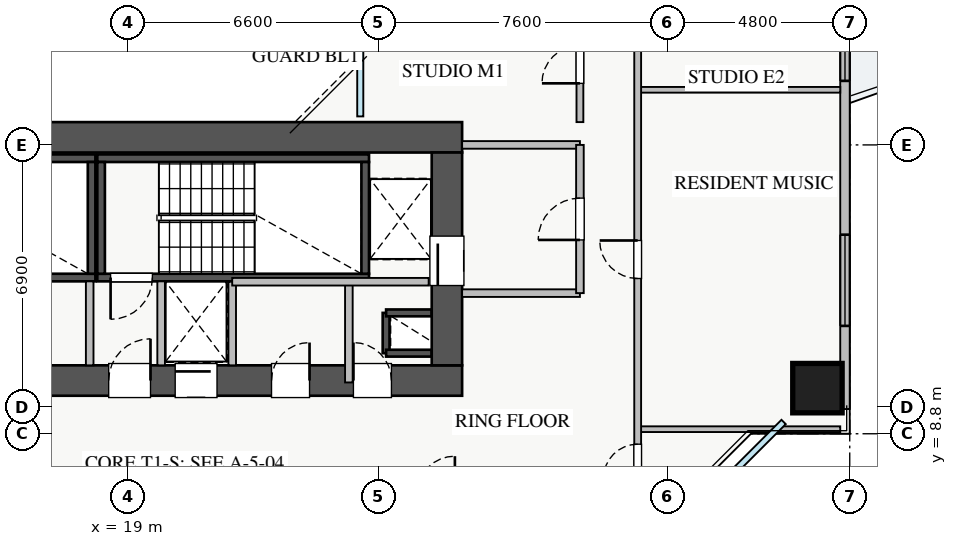
"""IFC4 building model, lengths in metres.
Left out: names, types, materials, properties, quantities, classifications, styles, units other than length and angle.
Written with IfcOpenShell. Run it as: python <this file> out.ifc"""

import sys

from ifc_helpers import new_model, si_unit, direction, frame, frame_2d, origin, origin_2d, place, context, subcontext, project, spatial, rectangle, extrude, source, transform, mapped, element, fill, save


model = new_model("IFC4")
c1 = context("Model", 3, precision=1e-05, world=origin(), true_north=direction((0.0, 1.0)))
c2 = subcontext(c1, "Body", "Model", "MODEL_VIEW")
j1 = project(units=[si_unit("LENGTHUNIT", "METRE"), si_unit("PLANEANGLEUNIT", "RADIAN")], contexts=[c1])
p1 = place(None, origin())
s1 = spatial("IfcSite", under=j1, at=p1, CompositionType="ELEMENT")
p2 = place(p1, origin())
s2 = spatial("IfcBuilding", under=s1, at=p2, CompositionType="ELEMENT")
p3 = place(p2, frame((0.0, 0.0, 79.5)))
s3 = spatial("IfcBuildingStorey", under=s2, at=p3, CompositionType="ELEMENT", Elevation=79.5)
p4 = place(p3, frame((25.8, 10.92, 0.0), z_axis=(0.0, 0.0, 1.0), x_axis=(0.0, 1.0, 0.0)))
e1 = element("IfcWall", 1, at=p4, inside=s3, PredefinedType="SHEAR", context=c2, shape_type="SweptSolid", body=[
    extrude(rectangle(XDim=1.06, YDim=0.18, at=frame_2d((0.53, 0.0))), origin(), (0.0, 0.0, 1.0), 3.07),
])
for number, where, z_axis, x_axis in (
    (2, (25.8, 11.98, 0.0), (0.0, 0.0, 1.0), (1.0, 0.0, 0.0)),
    (3, (25.8, 10.92, 0.0), (0.0, 0.0, 1.0), (1.0, 0.0, 0.0)),
):
    element("IfcWall", number, at=place(p3, frame(where, z_axis=z_axis, x_axis=x_axis)), inside=s3, PredefinedType="SHEAR", context=c2, shape_type="SweptSolid", body=[
        extrude(rectangle(XDim=1.2, YDim=0.18, at=frame_2d((0.6, 0.0))), origin(), (0.0, 0.0, 1.0), 3.07),
    ])
p5 = place(p3, frame((19.88, 12.8, 0.0), z_axis=(0.0, 0.0, 1.0), x_axis=(1.0, 0.0, 0.0)))
e4 = element("IfcWall", 4, at=p5, inside=s3, PredefinedType="SHEAR", context=c2, shape_type="SweptSolid", body=[
    extrude(rectangle(XDim=1.87, YDim=0.18, at=frame_2d((0.935, 0.0))), origin(), (0.0, 0.0, 1.0), 3.07),
])
p6 = place(p3, frame((11.0, 12.91, 0.0), z_axis=(0.0, 0.0, 1.0), x_axis=(1.0, 0.0, 0.0)))
e5 = element("IfcWall", 5, at=p6, inside=s3, PredefinedType="SHEAR", context=c2, shape_type="SweptSolid", body=[
    extrude(rectangle(XDim=7.15, YDim=0.2, at=frame_2d((3.575, 0.0))), origin(), (0.0, 0.0, 1.0), 3.25),
])
p7 = place(p6, frame((0.35, 0.0, 0.0)))
e6 = element("IfcOpeningElement", 6, at=p7, cuts=e5, PredefinedType="OPENING", context=c2, shape_type="SweptSolid", body=[
    extrude(rectangle(XDim=1.1, YDim=2.05, at=frame_2d((0.55, 1.025))), frame((0.0, 0.11, 0.0), z_axis=(0.0, -1.0, 0.0), x_axis=(1.0, 0.0, 0.0)), (0.0, 0.0, 1.0), 0.22),
])
p8 = place(p3, frame((11.0, 16.05, 0.0), z_axis=(0.0, 0.0, 1.0), x_axis=(1.0, 0.0, 0.0)))
e7 = element("IfcWall", 7, at=p8, inside=s3, PredefinedType="SHEAR", context=c2, shape_type="SweptSolid", body=[
    extrude(rectangle(XDim=7.15, YDim=0.2, at=frame_2d((3.575, 0.0))), origin(), (0.0, 0.0, 1.0), 3.25),
])
p9 = place(p3, frame((18.05, 13.01, 0.0), z_axis=(0.0, 0.0, 1.0), x_axis=(0.0, 1.0, 0.0)))
e8 = element("IfcWall", 8, at=p9, inside=s3, PredefinedType="SHEAR", context=c2, shape_type="SweptSolid", body=[
    extrude(rectangle(XDim=2.94, YDim=0.2, at=frame_2d((1.47, 0.0))), origin(), (0.0, 0.0, 1.0), 3.25),
])
p10 = place(p3, frame((18.2, 12.91, 0.0), z_axis=(0.0, 0.0, 1.0), x_axis=(1.0, 0.0, 0.0)))
e9 = element("IfcWall", 9, at=p10, inside=s3, PredefinedType="SHEAR", context=c2, shape_type="SweptSolid", body=[
    extrude(rectangle(XDim=7.15, YDim=0.2, at=frame_2d((3.575, 0.0))), origin(), (0.0, 0.0, 1.0), 3.25),
])
p11 = place(p10, frame((0.35, 0.0, 0.0)))
e10 = element("IfcOpeningElement", 10, at=p11, cuts=e9, PredefinedType="OPENING", context=c2, shape_type="SweptSolid", body=[
    extrude(rectangle(XDim=1.1, YDim=2.05, at=frame_2d((0.55, 1.025))), frame((0.0, 0.11, 0.0), z_axis=(0.0, -1.0, 0.0), x_axis=(1.0, 0.0, 0.0)), (0.0, 0.0, 1.0), 0.22),
])
p12 = place(p3, frame((18.2, 16.05, 0.0), z_axis=(0.0, 0.0, 1.0), x_axis=(1.0, 0.0, 0.0)))
e11 = element("IfcWall", 11, at=p12, inside=s3, PredefinedType="SHEAR", context=c2, shape_type="SweptSolid", body=[
    extrude(rectangle(XDim=7.15, YDim=0.2, at=frame_2d((3.575, 0.0))), origin(), (0.0, 0.0, 1.0), 3.25),
])
for number, where, z_axis, x_axis in (
    (12, (18.3, 13.01, 0.0), (0.0, 0.0, 1.0), (0.0, 1.0, 0.0)),
    (13, (25.25, 13.01, 0.0), (0.0, 0.0, 1.0), (0.0, 1.0, 0.0)),
):
    element("IfcWall", number, at=place(p3, frame(where, z_axis=z_axis, x_axis=x_axis)), inside=s3, PredefinedType="SHEAR", context=c2, shape_type="SweptSolid", body=[
        extrude(rectangle(XDim=2.94, YDim=0.2, at=frame_2d((1.47, 0.0))), origin(), (0.0, 0.0, 1.0), 3.25),
    ])
p13 = place(p3, frame((10.2, 10.2, 0.0), z_axis=(0.0, 0.0, 1.0), x_axis=(1.0, 0.0, 0.0)))
e14 = element("IfcWall", 14, at=p13, inside=s3, PredefinedType="SHEAR", context=c2, shape_type="SweptSolid", body=[
    extrude(rectangle(XDim=17.6, YDim=0.8, at=frame_2d((8.8, 0.0))), origin(), (0.0, 0.0, 1.0), 3.25),
])
p14 = place(p13, frame((1.15, 0.0, 0.0)))
e15 = element("IfcOpeningElement", 15, at=p14, cuts=e14, PredefinedType="OPENING", context=c2, shape_type="SweptSolid", body=[
    extrude(rectangle(XDim=1.1, YDim=2.05, at=frame_2d((0.55, 1.025))), frame((0.0, 0.41, 0.0), z_axis=(0.0, -1.0, 0.0), x_axis=(1.0, 0.0, 0.0)), (0.0, 0.0, 1.0), 0.82),
])
p15 = place(p13, frame((8.3, 0.0, 0.0)))
e16 = element("IfcOpeningElement", 16, at=p15, cuts=e14, PredefinedType="OPENING", context=c2, shape_type="SweptSolid", body=[
    extrude(rectangle(XDim=1.1, YDim=2.05, at=frame_2d((0.55, 1.025))), frame((0.0, 0.41, 0.0), z_axis=(0.0, -1.0, 0.0), x_axis=(1.0, 0.0, 0.0)), (0.0, 0.0, 1.0), 0.82),
])
p16 = place(p13, frame((10.05, 0.0, 0.0)))
e17 = element("IfcOpeningElement", 17, at=p16, cuts=e14, PredefinedType="OPENING", context=c2, shape_type="SweptSolid", body=[
    extrude(rectangle(XDim=1.1, YDim=2.05, at=frame_2d((0.55, 1.025))), frame((0.0, 0.41, 0.0), z_axis=(0.0, -1.0, 0.0), x_axis=(1.0, 0.0, 0.0)), (0.0, 0.0, 1.0), 0.82),
])
p17 = place(p13, frame((14.74, 0.0, 0.0)))
e18 = element("IfcOpeningElement", 18, at=p17, cuts=e14, PredefinedType="OPENING", context=c2, shape_type="SweptSolid", body=[
    extrude(rectangle(XDim=1.0, YDim=2.05, at=frame_2d((0.5, 1.025))), frame((0.0, 0.41, 0.0), z_axis=(0.0, -1.0, 0.0), x_axis=(1.0, 0.0, 0.0)), (0.0, 0.0, 1.0), 0.82),
])
p18 = place(p13, frame((12.585, 0.0, 0.0)))
e19 = element("IfcOpeningElement", 19, at=p18, cuts=e14, PredefinedType="OPENING", context=c2, shape_type="SweptSolid", body=[
    extrude(rectangle(XDim=1.0, YDim=2.05, at=frame_2d((0.5, 1.025))), frame((0.0, 0.41, 0.0), z_axis=(0.0, -1.0, 0.0), x_axis=(1.0, 0.0, 0.0)), (0.0, 0.0, 1.0), 0.82),
])
p19 = place(p3, frame((10.2, 16.6, 0.0), z_axis=(0.0, 0.0, 1.0), x_axis=(1.0, 0.0, 0.0)))
e20 = element("IfcWall", 20, at=p19, inside=s3, PredefinedType="SHEAR", context=c2, shape_type="SweptSolid", body=[
    extrude(rectangle(XDim=17.6, YDim=0.8, at=frame_2d((8.8, 0.0))), origin(), (0.0, 0.0, 1.0), 3.25),
])
p20 = place(p3, frame((27.4, 10.6, 0.0), z_axis=(0.0, 0.0, 1.0), x_axis=(0.0, 1.0, 0.0)))
e21 = element("IfcWall", 21, at=p20, inside=s3, PredefinedType="SHEAR", context=c2, shape_type="SweptSolid", body=[
    extrude(rectangle(XDim=5.6, YDim=0.8, at=frame_2d((2.8, 0.0))), origin(), (0.0, 0.0, 1.0), 3.25),
])
p21 = place(p20, frame((2.1, 0.0, 0.0)))
e22 = element("IfcOpeningElement", 22, at=p21, cuts=e21, PredefinedType="OPENING", context=c2, shape_type="SweptSolid", body=[
    extrude(rectangle(XDim=1.3, YDim=2.05, at=frame_2d((0.65, 1.025))), frame((0.0, 0.41, 0.0), z_axis=(0.0, -1.0, 0.0), x_axis=(1.0, 0.0, 0.0)), (0.0, 0.0, 1.0), 0.82),
])
m1 = source(origin(), c2, "Body", "SweptSolid", [
    extrude(rectangle(XDim=1.3, YDim=1.3, at=origin_2d()), origin(), (0.0, 0.0, 1.0), 3.25),
])
p22 = place(p3, frame((37.15, 10.0, 0.0), z_axis=(0.0, 0.0, 1.0), x_axis=(1.0, 0.0, 0.0)))
e23 = element("IfcColumn", 23, at=p22, inside=s3, PredefinedType="COLUMN", context=c2, shape_type="MappedRepresentation", body=[
    mapped(m1, transform((0.0, 0.0, 0.0), x_axis=(1.0, 0.0, 0.0), y_axis=(0.0, 1.0, 0.0), z_axis=(0.0, 0.0, 1.0), scale=1.0)),
])
p23 = place(p3, frame((37.875, 9.45, 0.0), z_axis=(0.0, 0.0, 1.0), x_axis=(0.0, 1.0, 0.0)))
e24 = element("IfcWall", 24, at=p23, inside=s3, PredefinedType="STANDARD", context=c2, shape_type="SweptSolid", body=[
    extrude(rectangle(XDim=27.1, YDim=0.25, at=frame_2d((13.55, 0.0))), origin(), (0.0, 0.0, 1.0), 2.61),
])
p24 = place(p23, frame((14.4, 0.0, 0.0)))
e25 = element("IfcOpeningElement", 25, at=p24, cuts=e24, PredefinedType="OPENING", context=c2, shape_type="SweptSolid", body=[
    extrude(rectangle(XDim=1.2, YDim=2.1, at=frame_2d((0.6, 1.05))), frame((0.0, 0.135, 0.0), z_axis=(0.0, -1.0, 0.0), x_axis=(1.0, 0.0, 0.0)), (0.0, 0.0, 1.0), 0.27),
])
p25 = place(p23, frame((2.188, 0.0, 0.9)))
e26 = element("IfcOpeningElement", 26, at=p25, cuts=e24, PredefinedType="OPENING", context=c2, shape_type="SweptSolid", body=[
    extrude(rectangle(XDim=2.4, YDim=1.48, at=frame_2d((1.2, 0.74))), frame((0.0, 0.135, 0.0), z_axis=(0.0, -1.0, 0.0), x_axis=(1.0, 0.0, 0.0)), (0.0, 0.0, 1.0), 0.27),
])
p26 = place(p23, frame((23.788, 0.0, 0.9)))
e27 = element("IfcOpeningElement", 27, at=p26, cuts=e24, PredefinedType="OPENING", context=c2, shape_type="SweptSolid", body=[
    extrude(rectangle(XDim=1.8, YDim=1.5, at=frame_2d((0.9, 0.75))), frame((0.0, 0.135, 0.0), z_axis=(0.0, -1.0, 0.0), x_axis=(1.0, 0.0, 0.0)), (0.0, 0.0, 1.0), 0.27),
])
p27 = place(p23, frame((19.758, 0.0, 0.9)))
e28 = element("IfcOpeningElement", 28, at=p27, cuts=e24, PredefinedType="OPENING", context=c2, shape_type="SweptSolid", body=[
    extrude(rectangle(XDim=2.4, YDim=1.5, at=frame_2d((1.2, 0.75))), frame((0.0, 0.135, 0.0), z_axis=(0.0, -1.0, 0.0), x_axis=(1.0, 0.0, 0.0)), (0.0, 0.0, 1.0), 0.27),
])
p28 = place(p23, frame((8.635, 0.0, 0.9)))
e29 = element("IfcOpeningElement", 29, at=p28, cuts=e24, PredefinedType="OPENING", context=c2, shape_type="SweptSolid", body=[
    extrude(rectangle(XDim=0.9, YDim=1.2, at=frame_2d((0.45, 0.6))), frame((0.0, 0.135, 0.0), z_axis=(0.0, -1.0, 0.0), x_axis=(1.0, 0.0, 0.0)), (0.0, 0.0, 1.0), 0.27),
])
for number, where, z_axis, x_axis in (
    (30, (27.8, 16.4, 0.0), (0.0, 0.0, 1.0), (1.0, 0.0, 0.0)),
    (31, (27.8, 12.5, 0.0), (0.0, 0.0, 1.0), (1.0, 0.0, 0.0)),
):
    element("IfcWall", number, at=place(p3, frame(where, z_axis=z_axis, x_axis=x_axis)), inside=s3, PredefinedType="PARTITIONING", context=c2, shape_type="SweptSolid", body=[
        extrude(rectangle(XDim=3.1, YDim=0.2, at=frame_2d((1.55, 0.0))), origin(), (0.0, 0.0, 1.0), 3.07),
    ])
p29 = place(p3, frame((30.9, 12.5, 0.0), z_axis=(0.0, 0.0, 1.0), x_axis=(0.0, 1.0, 0.0)))
e32 = element("IfcWall", 32, at=p29, inside=s3, PredefinedType="PARTITIONING", context=c2, shape_type="SweptSolid", body=[
    extrude(rectangle(XDim=3.9, YDim=0.2, at=frame_2d((1.95, 0.0))), origin(), (0.0, 0.0, 1.0), 3.07),
])
p30 = place(p29, frame((1.4, 0.0, 0.0)))
e33 = element("IfcOpeningElement", 33, at=p30, cuts=e32, PredefinedType="OPENING", context=c2, shape_type="SweptSolid", body=[
    extrude(rectangle(XDim=1.1, YDim=2.05, at=frame_2d((0.55, 1.025))), frame((0.0, 0.11, 0.0), z_axis=(0.0, -1.0, 0.0), x_axis=(1.0, 0.0, 0.0)), (0.0, 0.0, 1.0), 0.22),
])
for number, where, z_axis, x_axis in (
    (34, (18.0, 10.6, 0.0), (0.0, 0.0, 1.0), (0.0, 1.0, 0.0)),
    (35, (19.88, 10.6, 0.0), (0.0, 0.0, 1.0), (0.0, 1.0, 0.0)),
):
    element("IfcWall", number, at=place(p3, frame(where, z_axis=z_axis, x_axis=x_axis)), inside=s3, PredefinedType="PARTITIONING", context=c2, shape_type="SweptSolid", body=[
        extrude(rectangle(XDim=2.21, YDim=0.2, at=frame_2d((1.105, 0.0))), origin(), (0.0, 0.0, 1.0), 3.07),
    ])
p31 = place(p3, frame((24.82, 10.15, 0.0), z_axis=(0.0, 0.0, 1.0), x_axis=(0.0, 1.0, 0.0)))
e36 = element("IfcWall", 36, at=p31, inside=s3, PredefinedType="PARTITIONING", context=c2, shape_type="SweptSolid", body=[
    extrude(rectangle(XDim=2.65, YDim=0.2, at=frame_2d((1.325, 0.0))), origin(), (0.0, 0.0, 1.0), 3.07),
])
p32 = place(p3, frame((21.75, 10.6, 0.0), z_axis=(0.0, 0.0, 1.0), x_axis=(0.0, 1.0, 0.0)))
e37 = element("IfcWall", 37, at=p32, inside=s3, PredefinedType="PARTITIONING", context=c2, shape_type="SweptSolid", body=[
    extrude(rectangle(XDim=2.2, YDim=0.2, at=frame_2d((1.1, 0.0))), origin(), (0.0, 0.0, 1.0), 3.07),
])
p33 = place(p3, frame((21.75, 12.8, 0.0), z_axis=(0.0, 0.0, 1.0), x_axis=(1.0, 0.0, 0.0)))
e38 = element("IfcWall", 38, at=p33, inside=s3, PredefinedType="PARTITIONING", context=c2, shape_type="SweptSolid", body=[
    extrude(rectangle(XDim=5.17, YDim=0.2, at=frame_2d((2.585, 0.0))), origin(), (0.0, 0.0, 1.0), 3.07),
])
for number, where, z_axis, x_axis in (
    (39, (32.42, 8.92, 0.0), (0.0, 0.0, 1.0), (1.0, 0.0, 0.0)),
    (40, (32.42, 17.85, 0.0), (0.0, 0.0, 1.0), (1.0, 0.0, 0.0)),
):
    element("IfcWall", number, at=place(p3, frame(where, z_axis=z_axis, x_axis=x_axis)), inside=s3, PredefinedType="PARTITIONING", context=c2, shape_type="SweptSolid", body=[
        extrude(rectangle(XDim=5.33, YDim=0.15, at=frame_2d((2.665, 0.0))), origin(), (0.0, 0.0, 1.0), 3.07),
    ])
p34 = place(p3, frame((32.42, 7.21, 0.0), z_axis=(0.0, 0.0, 1.0), x_axis=(0.0, 1.0, 0.0)))
e41 = element("IfcWall", 41, at=p34, inside=s3, PredefinedType="PARTITIONING", context=c2, shape_type="SweptSolid", body=[
    extrude(rectangle(XDim=31.23, YDim=0.18, at=frame_2d((15.615, 0.0))), origin(), (0.0, 0.0, 1.0), 2.821),
])
p35 = place(p34, frame((30.09, 0.0, 0.0)))
e42 = element("IfcOpeningElement", 42, at=p35, cuts=e41, PredefinedType="OPENING", context=c2, shape_type="SweptSolid", body=[
    extrude(rectangle(XDim=0.9, YDim=2.05, at=frame_2d((0.45, 1.025))), frame((0.0, 0.1, 0.0), z_axis=(0.0, -1.0, 0.0), x_axis=(1.0, 0.0, 0.0)), (0.0, 0.0, 1.0), 0.2),
])
p36 = place(p34, frame((0.415, 0.0, 0.0)))
e43 = element("IfcOpeningElement", 43, at=p36, cuts=e41, PredefinedType="OPENING", context=c2, shape_type="SweptSolid", body=[
    extrude(rectangle(XDim=0.9, YDim=2.05, at=frame_2d((0.45, 1.025))), frame((0.0, 0.1, 0.0), z_axis=(0.0, -1.0, 0.0), x_axis=(1.0, 0.0, 0.0)), (0.0, 0.0, 1.0), 0.2),
])
p37 = place(p34, frame((5.675, 0.0, 0.0)))
e44 = element("IfcOpeningElement", 44, at=p37, cuts=e41, PredefinedType="OPENING", context=c2, shape_type="SweptSolid", body=[
    extrude(rectangle(XDim=1.0, YDim=2.05, at=frame_2d((0.5, 1.025))), frame((0.0, 0.1, 0.0), z_axis=(0.0, -1.0, 0.0), x_axis=(1.0, 0.0, 0.0)), (0.0, 0.0, 1.0), 0.2),
])
p38 = place(p34, frame((12.575, 0.0, 0.0)))
e45 = element("IfcOpeningElement", 45, at=p38, cuts=e41, PredefinedType="OPENING", context=c2, shape_type="SweptSolid", body=[
    extrude(rectangle(XDim=1.0, YDim=2.05, at=frame_2d((0.5, 1.025))), frame((0.0, 0.1, 0.0), z_axis=(0.0, -1.0, 0.0), x_axis=(1.0, 0.0, 0.0)), (0.0, 0.0, 1.0), 0.2),
])
p39 = place(p34, frame((22.5, 0.0, 0.0)))
e46 = element("IfcOpeningElement", 46, at=p39, cuts=e41, PredefinedType="OPENING", context=c2, shape_type="SweptSolid", body=[
    extrude(rectangle(XDim=1.0, YDim=2.05, at=frame_2d((0.5, 1.025))), frame((0.0, 0.1, 0.0), z_axis=(0.0, -1.0, 0.0), x_axis=(1.0, 0.0, 0.0)), (0.0, 0.0, 1.0), 0.2),
])
p40 = place(p3, frame((30.9, 17.0, 0.0), z_axis=(0.0, 0.0, 1.0), x_axis=(0.0, 1.0, 0.0)))
e47 = element("IfcWall", 47, at=p40, inside=s3, PredefinedType="PARTITIONING", context=c2, shape_type="SweptSolid", body=[
    extrude(rectangle(XDim=12.0, YDim=0.18, at=frame_2d((6.0, 0.0))), origin(), (0.0, 0.0, 1.0), 3.07),
])
p41 = place(p40, frame((1.02, 0.0, 0.0)))
e48 = element("IfcOpeningElement", 48, at=p41, cuts=e47, PredefinedType="OPENING", context=c2, shape_type="SweptSolid", body=[
    extrude(rectangle(XDim=1.0, YDim=2.05, at=frame_2d((0.5, 1.025))), frame((0.0, 0.1, 0.0), z_axis=(0.0, -1.0, 0.0), x_axis=(1.0, 0.0, 0.0)), (0.0, 0.0, 1.0), 0.2),
])
p42 = place(p40, frame((7.17, 0.0, 0.0)))
e49 = element("IfcOpeningElement", 49, at=p42, cuts=e47, PredefinedType="OPENING", context=c2, shape_type="SweptSolid", body=[
    extrude(rectangle(XDim=1.0, YDim=2.05, at=frame_2d((0.5, 1.025))), frame((0.0, 0.1, 0.0), z_axis=(0.0, -1.0, 0.0), x_axis=(1.0, 0.0, 0.0)), (0.0, 0.0, 1.0), 0.2),
])
m2 = source(origin(), c2, "Body", "SweptSolid", [
    extrude(rectangle(XDim=2.4, YDim=1.48, at=frame_2d((1.2, 0.74))), frame((0.0, 0.03, 0.0), z_axis=(0.0, -1.0, 0.0), x_axis=(1.0, 0.0, 0.0)), (0.0, 0.0, 1.0), 0.06),
])
p43 = place(p25, origin())
e50 = element("IfcWindow", 50, at=p43, inside=s3, PartitioningType="TRIPLE_PANEL_VERTICAL", PredefinedType="WINDOW", context=c2, shape_type="MappedRepresentation", body=[
    mapped(m2, transform((0.0, 0.0, 0.0), x_axis=(1.0, 0.0, 0.0), y_axis=(0.0, 1.0, 0.0), z_axis=(0.0, 0.0, 1.0), scale=1.0)),
])
fill(e26, e50)
m3 = source(origin(), c2, "Body", "SweptSolid", [
    extrude(rectangle(XDim=1.3, YDim=2.05, at=frame_2d((0.65, 1.025))), frame((0.0, 0.025, 0.0), z_axis=(0.0, -1.0, 0.0), x_axis=(1.0, 0.0, 0.0)), (0.0, 0.0, 1.0), 0.05),
])
p44 = place(p21, origin())
e51 = element("IfcDoor", 51, at=p44, inside=s3, OperationType="SLIDING_TO_RIGHT", PredefinedType="DOOR", context=c2, shape_type="MappedRepresentation", body=[
    mapped(m3, transform((0.0, 0.0, 0.0), x_axis=(1.0, 0.0, 0.0), y_axis=(0.0, 1.0, 0.0), z_axis=(0.0, 0.0, 1.0), scale=1.0)),
])
fill(e22, e51)
m4 = source(origin(), c2, "Body", "SweptSolid", [
    extrude(rectangle(XDim=1.1, YDim=2.05, at=frame_2d((0.55, 1.025))), frame((0.0, 0.025, 0.0), z_axis=(0.0, -1.0, 0.0), x_axis=(1.0, 0.0, 0.0)), (0.0, 0.0, 1.0), 0.05),
])
p45 = place(p15, origin())
e52 = element("IfcDoor", 52, at=p45, inside=s3, OperationType="SINGLE_SWING_RIGHT", PredefinedType="DOOR", context=c2, shape_type="MappedRepresentation", body=[
    mapped(m4, transform((0.0, 0.0, 0.0), x_axis=(1.0, 0.0, 0.0), y_axis=(0.0, 1.0, 0.0), z_axis=(0.0, 0.0, 1.0), scale=1.0)),
])
fill(e16, e52)
p46 = place(p11, frame((1.1, 0.0, 0.0), z_axis=(0.0, 0.0, 1.0), x_axis=(-1.0, 0.0, 0.0)))
e53 = element("IfcDoor", 53, at=p46, inside=s3, OperationType="SINGLE_SWING_LEFT", PredefinedType="DOOR", context=c2, shape_type="MappedRepresentation", body=[
    mapped(m4, transform((0.0, 0.0, 0.0), x_axis=(1.0, 0.0, 0.0), y_axis=(0.0, 1.0, 0.0), z_axis=(0.0, 0.0, 1.0), scale=1.0)),
])
fill(e10, e53)
p47 = place(p16, origin())
e54 = element("IfcDoor", 54, at=p47, inside=s3, OperationType="SLIDING_TO_RIGHT", PredefinedType="DOOR", context=c2, shape_type="MappedRepresentation", body=[
    mapped(m4, transform((0.0, 0.0, 0.0), x_axis=(1.0, 0.0, 0.0), y_axis=(0.0, 1.0, 0.0), z_axis=(0.0, 0.0, 1.0), scale=1.0)),
])
fill(e17, e54)
m5 = source(origin(), c2, "Body", "SweptSolid", [
    extrude(rectangle(XDim=1.0, YDim=2.05, at=frame_2d((0.5, 1.025))), frame((0.0, 0.025, 0.0), z_axis=(0.0, -1.0, 0.0), x_axis=(1.0, 0.0, 0.0)), (0.0, 0.0, 1.0), 0.05),
])
p48 = place(p17, origin())
e55 = element("IfcDoor", 55, at=p48, inside=s3, OperationType="SINGLE_SWING_LEFT", PredefinedType="DOOR", context=c2, shape_type="MappedRepresentation", body=[
    mapped(m5, transform((0.0, 0.0, 0.0), x_axis=(1.0, 0.0, 0.0), y_axis=(0.0, 1.0, 0.0), z_axis=(0.0, 0.0, 1.0), scale=1.0)),
])
fill(e18, e55)
p49 = place(p18, origin())
e56 = element("IfcDoor", 56, at=p49, inside=s3, OperationType="SINGLE_SWING_RIGHT", PredefinedType="DOOR", context=c2, shape_type="MappedRepresentation", body=[
    mapped(m5, transform((0.0, 0.0, 0.0), x_axis=(1.0, 0.0, 0.0), y_axis=(0.0, 1.0, 0.0), z_axis=(0.0, 0.0, 1.0), scale=1.0)),
])
fill(e19, e56)
p50 = place(p30, origin())
e57 = element("IfcDoor", 57, at=p50, inside=s3, OperationType="SINGLE_SWING_LEFT", PredefinedType="DOOR", context=c2, shape_type="MappedRepresentation", body=[
    mapped(m4, transform((0.0, 0.0, 0.0), x_axis=(1.0, 0.0, 0.0), y_axis=(0.0, 1.0, 0.0), z_axis=(0.0, 0.0, 1.0), scale=1.0)),
])
fill(e33, e57)
m6 = source(origin(), c2, "Body", "SweptSolid", [
    extrude(rectangle(XDim=0.9, YDim=2.05, at=frame_2d((0.45, 1.025))), frame((0.0, 0.025, 0.0), z_axis=(0.0, -1.0, 0.0), x_axis=(1.0, 0.0, 0.0)), (0.0, 0.0, 1.0), 0.05),
])
p51 = place(p36, origin())
e58 = element("IfcDoor", 58, at=p51, inside=s3, OperationType="SINGLE_SWING_LEFT", PredefinedType="DOOR", context=c2, shape_type="MappedRepresentation", body=[
    mapped(m6, transform((0.0, 0.0, 0.0), x_axis=(1.0, 0.0, 0.0), y_axis=(0.0, 1.0, 0.0), z_axis=(0.0, 0.0, 1.0), scale=1.0)),
])
fill(e43, e58)
p52 = place(p37, origin())
e59 = element("IfcDoor", 59, at=p52, inside=s3, OperationType="SINGLE_SWING_RIGHT", PredefinedType="DOOR", context=c2, shape_type="MappedRepresentation", body=[
    mapped(m5, transform((0.0, 0.0, 0.0), x_axis=(1.0, 0.0, 0.0), y_axis=(0.0, 1.0, 0.0), z_axis=(0.0, 0.0, 1.0), scale=1.0)),
])
fill(e44, e59)
p53 = place(p41, origin())
e60 = element("IfcDoor", 60, at=p53, inside=s3, OperationType="SINGLE_SWING_LEFT", PredefinedType="DOOR", context=c2, shape_type="MappedRepresentation", body=[
    mapped(m5, transform((0.0, 0.0, 0.0), x_axis=(1.0, 0.0, 0.0), y_axis=(0.0, 1.0, 0.0), z_axis=(0.0, 0.0, 1.0), scale=1.0)),
])
fill(e48, e60)
m7 = source(origin(), c2, "Body", "SweptSolid", [
    extrude(rectangle(XDim=0.9, YDim=1.2, at=frame_2d((0.45, 0.6))), frame((0.0, 0.03, 0.0), z_axis=(0.0, -1.0, 0.0), x_axis=(1.0, 0.0, 0.0)), (0.0, 0.0, 1.0), 0.06),
])
p54 = place(p28, origin())
e61 = element("IfcWindow", 61, at=p54, inside=s3, PartitioningType="SINGLE_PANEL", PredefinedType="WINDOW", context=c2, shape_type="MappedRepresentation", body=[
    mapped(m7, transform((0.0, 0.0, 0.0), x_axis=(1.0, 0.0, 0.0), y_axis=(0.0, 1.0, 0.0), z_axis=(0.0, 0.0, 1.0), scale=1.0)),
])
fill(e29, e61)
save(model, sys.argv[1])
